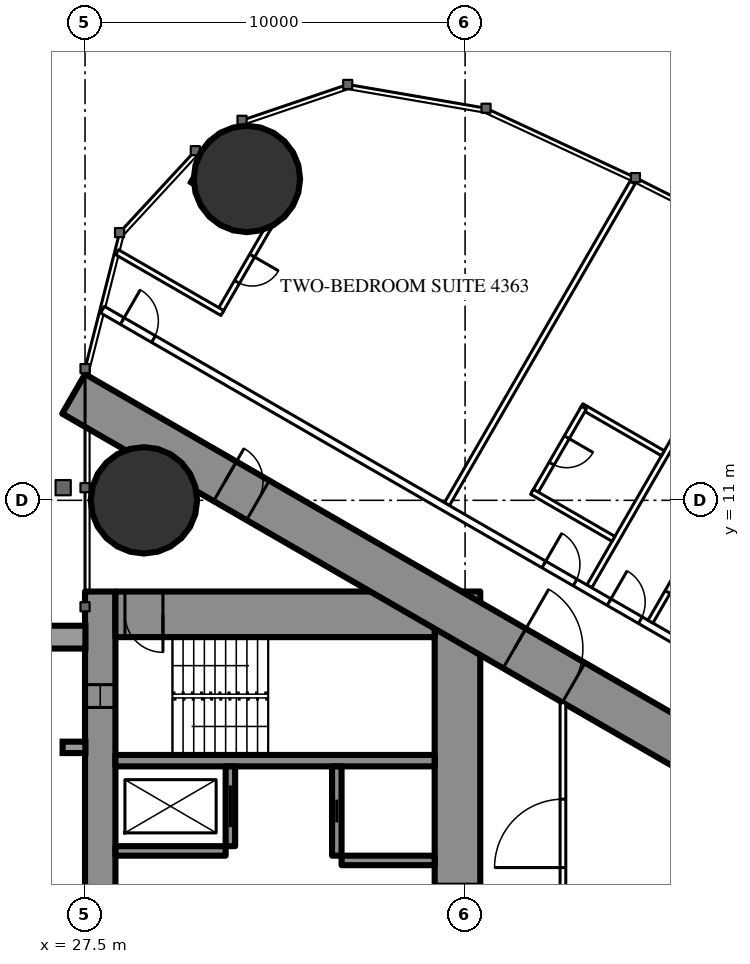
"""IFC4 building model, lengths in metres.
Left out: names, types, materials, properties, quantities, classifications, styles, units other than length and angle.
Written with IfcOpenShell. Run it as: python <this file> out.ifc"""

import sys

from ifc_helpers import new_model, si_unit, direction, frame, frame_2d, origin, origin_2d, place, context, subcontext, project, spatial, rectangle, circle, extrude, element, fill, save


model = new_model("IFC4")
c1 = context("Model", 3, precision=1e-05, world=origin(), true_north=direction((0.0, 1.0)))
c2 = subcontext(c1, "Body", "Model", "MODEL_VIEW")
j1 = project(units=[si_unit("LENGTHUNIT", "METRE"), si_unit("PLANEANGLEUNIT", "RADIAN")], contexts=[c1])
p1 = place(None, origin())
s1 = spatial("IfcSite", under=j1, at=p1, CompositionType="ELEMENT")
p2 = place(p1, origin())
s2 = spatial("IfcBuilding", under=s1, at=p2, CompositionType="ELEMENT")
p3 = place(p2, frame((0.0, 0.0, 163.3)))
s3 = spatial("IfcBuildingStorey", under=s2, at=p3, CompositionType="ELEMENT", Elevation=163.3)
for number, where, z_axis, x_axis in (
    (1, (31.76, 19.456, 0.0), (0.0, 0.0, 1.0), (1.0, 0.0, 0.0)),
    (2, (29.05, 11.0, 0.0), (0.0, 0.0, 1.0), (1.0, 0.0, 0.0)),
):
    element("IfcColumn", number, at=place(p3, frame(where, z_axis=z_axis, x_axis=x_axis)), inside=s3, PredefinedType="COLUMN", context=c2, shape_type="SweptSolid", body=[
        extrude(circle(Radius=1.4, at=origin_2d()), origin(), (0.0, 0.0, 1.0), 3.5),
    ])
p4 = place(p3, frame((27.9, -8.6, 0.0), z_axis=(0.0, 0.0, 1.0), x_axis=(0.0, 1.0, 0.0)))
e3 = element("IfcWall", 3, at=p4, inside=s3, PredefinedType="SHEAR", context=c2, shape_type="SweptSolid", body=[
    extrude(rectangle(XDim=17.2, YDim=0.8, at=frame_2d((8.6, 0.0))), origin(), (0.0, 0.0, 1.0), 3.5),
])
p5 = place(p4, frame((2.45, 0.0, 0.6)))
e4 = element("IfcOpeningElement", 4, at=p5, cuts=e3, PredefinedType="OPENING", context=c2, shape_type="SweptSolid", body=[
    extrude(rectangle(XDim=0.6, YDim=2.1, at=frame_2d((0.3, 1.05))), frame((0.0, 0.41, 0.0), z_axis=(0.0, -1.0, 0.0), x_axis=(1.0, 0.0, 0.0)), (0.0, 0.0, 1.0), 0.82),
])
p6 = place(p4, frame((14.15, 0.0, 0.6)))
e5 = element("IfcOpeningElement", 5, at=p6, cuts=e3, PredefinedType="OPENING", context=c2, shape_type="SweptSolid", body=[
    extrude(rectangle(XDim=0.6, YDim=2.1, at=frame_2d((0.3, 1.05))), frame((0.0, 0.41, 0.0), z_axis=(0.0, -1.0, 0.0), x_axis=(1.0, 0.0, 0.0)), (0.0, 0.0, 1.0), 0.82),
])
p7 = place(p3, frame((37.3, -8.6, 0.0), z_axis=(0.0, 0.0, 1.0), x_axis=(0.0, 1.0, 0.0)))
e6 = element("IfcWall", 6, at=p7, inside=s3, PredefinedType="SHEAR", context=c2, shape_type="SweptSolid", body=[
    extrude(rectangle(XDim=17.2, YDim=1.2, at=frame_2d((8.6, 0.0))), origin(), (0.0, 0.0, 1.0), 3.5),
])
p8 = place(p7, frame((7.7, 0.0, 0.0)))
e7 = element("IfcOpeningElement", 7, at=p8, cuts=e6, PredefinedType="OPENING", context=c2, shape_type="SweptSolid", body=[
    extrude(rectangle(XDim=1.8, YDim=2.2, at=frame_2d((0.9, 1.1))), frame((0.0, 0.61, 0.0), z_axis=(0.0, -1.0, 0.0), x_axis=(1.0, 0.0, 0.0)), (0.0, 0.0, 1.0), 1.22),
])
p9 = place(p3, frame((28.3, 8.0, 0.0), z_axis=(0.0, 0.0, 1.0), x_axis=(1.0, 0.0, 0.0)))
e8 = element("IfcWall", 8, at=p9, inside=s3, PredefinedType="SHEAR", context=c2, shape_type="SweptSolid", body=[
    extrude(rectangle(XDim=8.4, YDim=1.2, at=frame_2d((4.2, 0.0))), origin(), (0.0, 0.0, 1.0), 3.5),
])
p10 = place(p9, frame((0.25, 0.0, 0.0)))
e9 = element("IfcOpeningElement", 9, at=p10, cuts=e8, PredefinedType="OPENING", context=c2, shape_type="SweptSolid", body=[
    extrude(rectangle(XDim=1.0, YDim=2.2, at=frame_2d((0.5, 1.1))), frame((0.0, 0.61, 0.0), z_axis=(0.0, -1.0, 0.0), x_axis=(1.0, 0.0, 0.0)), (0.0, 0.0, 1.0), 1.22),
])
p11 = place(p3, frame((28.3, 4.15, 0.0), z_axis=(0.0, 0.0, 1.0), x_axis=(1.0, 0.0, 0.0)))
e10 = element("IfcWall", 10, at=p11, inside=s3, PredefinedType="SHEAR", context=c2, shape_type="SweptSolid", body=[
    extrude(rectangle(XDim=8.4, YDim=0.3, at=frame_2d((4.2, 0.0))), origin(), (0.0, 0.0, 1.0), 3.5),
])
p12 = place(p3, frame((31.325, 1.9, 0.0), z_axis=(0.0, 0.0, 1.0), x_axis=(0.0, 1.0, 0.0)))
e11 = element("IfcWall", 11, at=p12, inside=s3, PredefinedType="SHEAR", context=c2, shape_type="SweptSolid", body=[
    extrude(rectangle(XDim=2.1, YDim=0.25, at=frame_2d((1.05, 0.0))), origin(), (0.0, 0.0, 1.0), 3.5),
])
p13 = place(p12, frame((0.5, 0.0, 0.0)))
e12 = element("IfcOpeningElement", 12, at=p13, cuts=e11, PredefinedType="OPENING", context=c2, shape_type="SweptSolid", body=[
    extrude(rectangle(XDim=1.1, YDim=2.2, at=frame_2d((0.55, 1.1))), frame((0.0, 0.135, 0.0), z_axis=(0.0, -1.0, 0.0), x_axis=(1.0, 0.0, 0.0)), (0.0, 0.0, 1.0), 0.27),
])
p14 = place(p3, frame((34.125, 1.65, 0.0), z_axis=(0.0, 0.0, 1.0), x_axis=(0.0, 1.0, 0.0)))
e13 = element("IfcWall", 13, at=p14, inside=s3, PredefinedType="SHEAR", context=c2, shape_type="SweptSolid", body=[
    extrude(rectangle(XDim=2.35, YDim=0.25, at=frame_2d((1.175, 0.0))), origin(), (0.0, 0.0, 1.0), 3.5),
])
p15 = place(p14, frame((0.875, 0.0, 0.0)))
e14 = element("IfcOpeningElement", 14, at=p15, cuts=e13, PredefinedType="OPENING", context=c2, shape_type="SweptSolid", body=[
    extrude(rectangle(XDim=0.6, YDim=2.0, at=frame_2d((0.3, 1.0))), frame((0.0, 0.135, 0.0), z_axis=(0.0, -1.0, 0.0), x_axis=(1.0, 0.0, 0.0)), (0.0, 0.0, 1.0), 0.27),
])
p16 = place(p3, frame((28.3, 1.775, 0.0), z_axis=(0.0, 0.0, 1.0), x_axis=(1.0, 0.0, 0.0)))
e15 = element("IfcWall", 15, at=p16, inside=s3, PredefinedType="SHEAR", context=c2, shape_type="SweptSolid", body=[
    extrude(rectangle(XDim=2.9, YDim=0.25, at=frame_2d((1.45, 0.0))), origin(), (0.0, 0.0, 1.0), 3.5),
])
p17 = place(p3, frame((34.25, 1.525, 0.0), z_axis=(0.0, 0.0, 1.0), x_axis=(1.0, 0.0, 0.0)))
e16 = element("IfcWall", 16, at=p17, inside=s3, PredefinedType="SHEAR", context=c2, shape_type="SweptSolid", body=[
    extrude(rectangle(XDim=2.45, YDim=0.25, at=frame_2d((1.225, 0.0))), origin(), (0.0, 0.0, 1.0), 3.5),
])
p18 = place(p3, frame((27.2, 13.8, 0.0), z_axis=(0.0, 0.0, 1.0), x_axis=(0.866024515034, -0.500001539357, 0.0)))
e17 = element("IfcWall", 17, at=p18, inside=s3, PredefinedType="SHEAR", context=c2, shape_type="SweptSolid", body=[
    extrude(rectangle(XDim=26.907, YDim=1.2, at=frame_2d((13.454, 0.0))), origin(), (0.0, 0.0, 1.0), 3.5),
])
p19 = place(p18, frame((4.6, 0.0, 0.0)))
e18 = element("IfcOpeningElement", 18, at=p19, cuts=e17, PredefinedType="OPENING", context=c2, shape_type="SweptSolid", body=[
    extrude(rectangle(XDim=1.0, YDim=2.2, at=frame_2d((0.5, 1.1))), frame((0.0, 0.61, 0.0), z_axis=(0.0, -1.0, 0.0), x_axis=(1.0, 0.0, 0.0)), (0.0, 0.0, 1.0), 1.22),
])
p20 = place(p18, frame((13.395, 0.0, 0.0)))
e19 = element("IfcOpeningElement", 19, at=p20, cuts=e17, PredefinedType="OPENING", context=c2, shape_type="SweptSolid", body=[
    extrude(rectangle(XDim=1.8, YDim=2.2, at=frame_2d((0.9, 1.1))), frame((0.0, 0.61, 0.0), z_axis=(0.0, -1.0, 0.0), x_axis=(1.0, 0.0, 0.0)), (0.0, 0.0, 1.0), 1.22),
])
p21 = place(p3, frame((37.022, 10.9, 0.0), z_axis=(0.0, 0.0, 1.0), x_axis=(0.499998620953, 0.866026199976, 0.0)))
e20 = element("IfcWall", 20, at=p21, inside=s3, PredefinedType="PARTITIONING", context=c2, shape_type="SweptSolid", body=[
    extrude(rectangle(XDim=9.77, YDim=0.15, at=frame_2d((4.885, 0.0))), origin(), (0.0, 0.0, 1.0), 3.25),
])
p22 = place(p3, frame((40.769, 8.737, 0.0), z_axis=(0.0, 0.0, 1.0), x_axis=(0.500013115284, 0.866017831539, 0.0)))
e21 = element("IfcWall", 21, at=p22, inside=s3, PredefinedType="PARTITIONING", context=c2, shape_type="SweptSolid", body=[
    extrude(rectangle(XDim=7.198, YDim=0.15, at=frame_2d((3.599, 0.0))), origin(), (0.0, 0.0, 1.0), 2.3),
])
p23 = place(p3, frame((27.959, 16.017, 0.0), z_axis=(0.0, 0.0, 1.0), x_axis=(0.866027146794, -0.499996981007, 0.0)))
e22 = element("IfcWall", 22, at=p23, inside=s3, PredefinedType="PARTITIONING", context=c2, shape_type="SweptSolid", body=[
    extrude(rectangle(XDim=21.657, YDim=0.2, at=frame_2d((10.829, 0.0))), origin(), (0.0, 0.0, 1.0), 3.25),
])
p24 = place(p23, frame((15.391, 0.0, 0.0)))
e23 = element("IfcOpeningElement", 23, at=p24, cuts=e22, PredefinedType="OPENING", context=c2, shape_type="SweptSolid", body=[
    extrude(rectangle(XDim=0.95, YDim=2.2, at=frame_2d((0.475, 1.1))), frame((0.0, 0.11, 0.0), z_axis=(0.0, -1.0, 0.0), x_axis=(1.0, 0.0, 0.0)), (0.0, 0.0, 1.0), 0.22),
])
p25 = place(p23, frame((13.409, 0.0, 0.0)))
e24 = element("IfcOpeningElement", 24, at=p25, cuts=e22, PredefinedType="OPENING", context=c2, shape_type="SweptSolid", body=[
    extrude(rectangle(XDim=0.95, YDim=2.2, at=frame_2d((0.475, 1.1))), frame((0.0, 0.11, 0.0), z_axis=(0.0, -1.0, 0.0), x_axis=(1.0, 0.0, 0.0)), (0.0, 0.0, 1.0), 0.22),
])
p26 = place(p23, frame((0.6, 0.0, 0.0)))
e25 = element("IfcOpeningElement", 25, at=p26, cuts=e22, PredefinedType="OPENING", context=c2, shape_type="SweptSolid", body=[
    extrude(rectangle(XDim=0.95, YDim=2.2, at=frame_2d((0.475, 1.1))), frame((0.0, 0.11, 0.0), z_axis=(0.0, -1.0, 0.0), x_axis=(1.0, 0.0, 0.0)), (0.0, 0.0, 1.0), 0.22),
])
p27 = place(p23, frame((19.349, 0.0, 0.0)))
e26 = element("IfcOpeningElement", 26, at=p27, cuts=e22, PredefinedType="OPENING", context=c2, shape_type="SweptSolid", body=[
    extrude(rectangle(XDim=1.8, YDim=2.2, at=frame_2d((0.9, 1.1))), frame((0.0, 0.11, 0.0), z_axis=(0.0, -1.0, 0.0), x_axis=(1.0, 0.0, 0.0)), (0.0, 0.0, 1.0), 0.22),
])
p28 = place(p3, frame((42.378, 7.808, 0.0), z_axis=(0.0, 0.0, 1.0), x_axis=(0.500006934395, 0.866021400173, 0.0)))
e27 = element("IfcWall", 27, at=p28, inside=s3, PredefinedType="PARTITIONING", context=c2, shape_type="SweptSolid", body=[
    extrude(rectangle(XDim=2.6, YDim=0.15, at=frame_2d((1.3, 0.0))), origin(), (0.0, 0.0, 1.0), 3.25),
])
p29 = place(p28, frame((0.9, 0.0, 0.0)))
e28 = element("IfcOpeningElement", 28, at=p29, cuts=e27, PredefinedType="OPENING", context=c2, shape_type="SweptSolid", body=[
    extrude(rectangle(XDim=0.8, YDim=2.2, at=frame_2d((0.4, 1.1))), frame((0.0, 0.085, 0.0), z_axis=(0.0, -1.0, 0.0), x_axis=(1.0, 0.0, 0.0)), (0.0, 0.0, 1.0), 0.17),
])
p30 = place(p3, frame((40.561, 13.476, 0.0), z_axis=(0.0, 0.0, 1.0), x_axis=(0.866006523861, -0.500032699561, 0.0)))
e29 = element("IfcWall", 29, at=p30, inside=s3, PredefinedType="PARTITIONING", context=c2, shape_type="SweptSolid", body=[
    extrude(rectangle(XDim=2.475, YDim=0.15, at=frame_2d((1.237, 0.0))), origin(), (0.0, 0.0, 1.0), 3.25),
])
p31 = place(p3, frame((39.326, 11.187, 0.0), z_axis=(0.0, 0.0, 1.0), x_axis=(0.500047596559, 0.865997922154, 0.0)))
e30 = element("IfcWall", 30, at=p31, inside=s3, PredefinedType="PARTITIONING", context=c2, shape_type="SweptSolid", body=[
    extrude(rectangle(XDim=2.6, YDim=0.15, at=frame_2d((1.3, 0.0))), origin(), (0.0, 0.0, 1.0), 3.25),
])
p32 = place(p31, frame((0.9, 0.0, 0.0)))
e31 = element("IfcOpeningElement", 31, at=p32, cuts=e30, PredefinedType="OPENING", context=c2, shape_type="SweptSolid", body=[
    extrude(rectangle(XDim=0.8, YDim=2.2, at=frame_2d((0.4, 1.1))), frame((0.0, 0.085, 0.0), z_axis=(0.0, -1.0, 0.0), x_axis=(1.0, 0.0, 0.0)), (0.0, 0.0, 1.0), 0.17),
])
for number, where, z_axis, x_axis in (
    (32, (39.261, 11.224, 0.0), (0.0, 0.0, 1.0), (0.866, -0.5, 0.0)),
    (33, (30.269, 19.418, 0.0), (0.0, 0.0, 1.0), (0.866, -0.5, 0.0)),
):
    element("IfcWall", number, at=place(p3, frame(where, z_axis=z_axis, x_axis=x_axis)), inside=s3, PredefinedType="PARTITIONING", context=c2, shape_type="SweptSolid", body=[
        extrude(rectangle(XDim=2.475, YDim=0.15, at=frame_2d((1.237, 0.0))), origin(), (0.0, 0.0, 1.0), 3.25),
    ])
p33 = place(p3, frame((31.048, 15.966, 0.0), z_axis=(0.0, 0.0, 1.0), x_axis=(0.499936506574, 0.866062058628, 0.0)))
e34 = element("IfcWall", 34, at=p33, inside=s3, PredefinedType="PARTITIONING", context=c2, shape_type="SweptSolid", body=[
    extrude(rectangle(XDim=2.6, YDim=0.15, at=frame_2d((1.3, 0.0))), origin(), (0.0, 0.0, 1.0), 2.3),
])
p34 = place(p33, frame((0.9, 0.0, 0.0)))
e35 = element("IfcOpeningElement", 35, at=p34, cuts=e34, PredefinedType="OPENING", context=c2, shape_type="SweptSolid", body=[
    extrude(rectangle(XDim=0.8, YDim=2.2, at=frame_2d((0.4, 1.1))), frame((0.0, 0.085, 0.0), z_axis=(0.0, -1.0, 0.0), x_axis=(1.0, 0.0, 0.0)), (0.0, 0.0, 1.0), 0.17),
])
p35 = place(p3, frame((28.343, 17.528, 0.0), z_axis=(0.0, 0.0, 1.0), x_axis=(0.86600760081, -0.500030834389, 0.0)))
e36 = element("IfcWall", 36, at=p35, inside=s3, PredefinedType="PARTITIONING", context=c2, shape_type="SweptSolid", body=[
    extrude(rectangle(XDim=3.198, YDim=0.15, at=frame_2d((1.599, 0.0))), origin(), (0.0, 0.0, 1.0), 3.25),
])
p36 = place(p3, frame((40.075, -1.2, 0.0), z_axis=(0.0, 0.0, 1.0), x_axis=(0.0, 1.0, 0.0)))
e37 = element("IfcWall", 37, at=p36, inside=s3, PredefinedType="PARTITIONING", context=c2, shape_type="SweptSolid", body=[
    extrude(rectangle(XDim=6.874, YDim=0.15, at=frame_2d((3.437, 0.0))), origin(), (0.0, 0.0, 1.0), 3.25),
])
p37 = place(p36, frame((2.537, 0.0, 0.0)))
e38 = element("IfcOpeningElement", 38, at=p37, cuts=e37, PredefinedType="OPENING", context=c2, shape_type="SweptSolid", body=[
    extrude(rectangle(XDim=1.8, YDim=2.2, at=frame_2d((0.9, 1.1))), frame((0.0, 0.085, 0.0), z_axis=(0.0, -1.0, 0.0), x_axis=(1.0, 0.0, 0.0)), (0.0, 0.0, 1.0), 0.17),
])
p38 = place(p29, origin())
e39 = element("IfcDoor", 39, at=p38, inside=s3, OperationType="SINGLE_SWING_RIGHT", PredefinedType="DOOR", context=c2, shape_type="SweptSolid", body=[
    extrude(rectangle(XDim=0.8, YDim=2.2, at=frame_2d((0.4, 1.1))), frame((0.0, 0.025, 0.0), z_axis=(0.0, -1.0, 0.0), x_axis=(1.0, 0.0, 0.0)), (0.0, 0.0, 1.0), 0.05),
])
fill(e28, e39)
p39 = place(p24, origin())
e40 = element("IfcDoor", 40, at=p39, inside=s3, OperationType="SINGLE_SWING_LEFT", PredefinedType="DOOR", context=c2, shape_type="SweptSolid", body=[
    extrude(rectangle(XDim=0.95, YDim=2.2, at=frame_2d((0.475, 1.1))), frame((0.0, 0.025, 0.0), z_axis=(0.0, -1.0, 0.0), x_axis=(1.0, 0.0, 0.0)), (0.0, 0.0, 1.0), 0.05),
])
fill(e23, e40)
p40 = place(p32, origin())
e41 = element("IfcDoor", 41, at=p40, inside=s3, OperationType="SINGLE_SWING_RIGHT", PredefinedType="DOOR", context=c2, shape_type="SweptSolid", body=[
    extrude(rectangle(XDim=0.8, YDim=2.2, at=frame_2d((0.4, 1.1))), frame((0.0, 0.025, 0.0), z_axis=(0.0, -1.0, 0.0), x_axis=(1.0, 0.0, 0.0)), (0.0, 0.0, 1.0), 0.05),
])
fill(e31, e41)
p41 = place(p25, origin())
e42 = element("IfcDoor", 42, at=p41, inside=s3, OperationType="SINGLE_SWING_LEFT", PredefinedType="DOOR", context=c2, shape_type="SweptSolid", body=[
    extrude(rectangle(XDim=0.95, YDim=2.2, at=frame_2d((0.475, 1.1))), frame((0.0, 0.025, 0.0), z_axis=(0.0, -1.0, 0.0), x_axis=(1.0, 0.0, 0.0)), (0.0, 0.0, 1.0), 0.05),
])
fill(e24, e42)
p42 = place(p34, origin())
e43 = element("IfcDoor", 43, at=p42, inside=s3, OperationType="SINGLE_SWING_RIGHT", PredefinedType="DOOR", context=c2, shape_type="SweptSolid", body=[
    extrude(rectangle(XDim=0.8, YDim=2.2, at=frame_2d((0.4, 1.1))), frame((0.0, 0.025, 0.0), z_axis=(0.0, -1.0, 0.0), x_axis=(1.0, 0.0, 0.0)), (0.0, 0.0, 1.0), 0.05),
])
fill(e35, e43)
p43 = place(p26, origin())
e44 = element("IfcDoor", 44, at=p43, inside=s3, OperationType="SINGLE_SWING_LEFT", PredefinedType="DOOR", context=c2, shape_type="SweptSolid", body=[
    extrude(rectangle(XDim=0.95, YDim=2.2, at=frame_2d((0.475, 1.1))), frame((0.0, 0.025, 0.0), z_axis=(0.0, -1.0, 0.0), x_axis=(1.0, 0.0, 0.0)), (0.0, 0.0, 1.0), 0.05),
])
fill(e25, e44)
p44 = place(p37, origin())
e45 = element("IfcDoor", 45, at=p44, inside=s3, OperationType="DOUBLE_DOOR_SINGLE_SWING", PredefinedType="DOOR", context=c2, shape_type="SweptSolid", body=[
    extrude(rectangle(XDim=1.8, YDim=2.2, at=frame_2d((0.9, 1.1))), frame((0.0, 0.025, 0.0), z_axis=(0.0, -1.0, 0.0), x_axis=(1.0, 0.0, 0.0)), (0.0, 0.0, 1.0), 0.05),
])
fill(e38, e45)
p45 = place(p19, origin())
e46 = element("IfcDoor", 46, at=p45, inside=s3, OperationType="SINGLE_SWING_LEFT", PredefinedType="DOOR", context=c2, shape_type="SweptSolid", body=[
    extrude(rectangle(XDim=1.0, YDim=2.2, at=frame_2d((0.5, 1.1))), frame((0.0, 0.025, 0.0), z_axis=(0.0, -1.0, 0.0), x_axis=(1.0, 0.0, 0.0)), (0.0, 0.0, 1.0), 0.05),
])
fill(e18, e46)
p46 = place(p20, origin())
e47 = element("IfcDoor", 47, at=p46, inside=s3, OperationType="DOUBLE_DOOR_SINGLE_SWING", PredefinedType="DOOR", context=c2, shape_type="SweptSolid", body=[
    extrude(rectangle(XDim=1.8, YDim=2.2, at=frame_2d((0.9, 1.1))), frame((0.0, 0.025, 0.0), z_axis=(0.0, -1.0, 0.0), x_axis=(1.0, 0.0, 0.0)), (0.0, 0.0, 1.0), 0.05),
])
fill(e19, e47)
p47 = place(p10, origin())
e48 = element("IfcDoor", 48, at=p47, inside=s3, OperationType="SINGLE_SWING_RIGHT", PredefinedType="DOOR", context=c2, shape_type="SweptSolid", body=[
    extrude(rectangle(XDim=1.0, YDim=2.2, at=frame_2d((0.5, 1.1))), frame((0.0, 0.025, 0.0), z_axis=(0.0, -1.0, 0.0), x_axis=(1.0, 0.0, 0.0)), (0.0, 0.0, 1.0), 0.05),
])
fill(e9, e48)
p48 = place(p13, origin())
e49 = element("IfcDoor", 49, at=p48, inside=s3, OperationType="SLIDING_TO_LEFT", PredefinedType="USERDEFINED", context=c2, shape_type="SweptSolid", body=[
    extrude(rectangle(XDim=1.1, YDim=2.2, at=frame_2d((0.55, 1.1))), frame((0.0, 0.025, 0.0), z_axis=(0.0, -1.0, 0.0), x_axis=(1.0, 0.0, 0.0)), (0.0, 0.0, 1.0), 0.05),
])
fill(e12, e49)
p49 = place(p15, origin())
e50 = element("IfcDoor", 50, at=p49, inside=s3, OperationType="SLIDING_TO_LEFT", PredefinedType="DOOR", context=c2, shape_type="SweptSolid", body=[
    extrude(rectangle(XDim=0.6, YDim=2.0, at=frame_2d((0.3, 1.0))), frame((0.0, 0.025, 0.0), z_axis=(0.0, -1.0, 0.0), x_axis=(1.0, 0.0, 0.0)), (0.0, 0.0, 1.0), 0.05),
])
fill(e14, e50)
p50 = place(p6, origin())
e51 = element("IfcWindow", 51, at=p50, inside=s3, PartitioningType="SINGLE_PANEL", PredefinedType="WINDOW", context=c2, shape_type="SweptSolid", body=[
    extrude(rectangle(XDim=0.6, YDim=2.1, at=frame_2d((0.3, 1.05))), frame((0.0, 0.03, 0.0), z_axis=(0.0, -1.0, 0.0), x_axis=(1.0, 0.0, 0.0)), (0.0, 0.0, 1.0), 0.06),
])
fill(e5, e51)
save(model, sys.argv[1])
